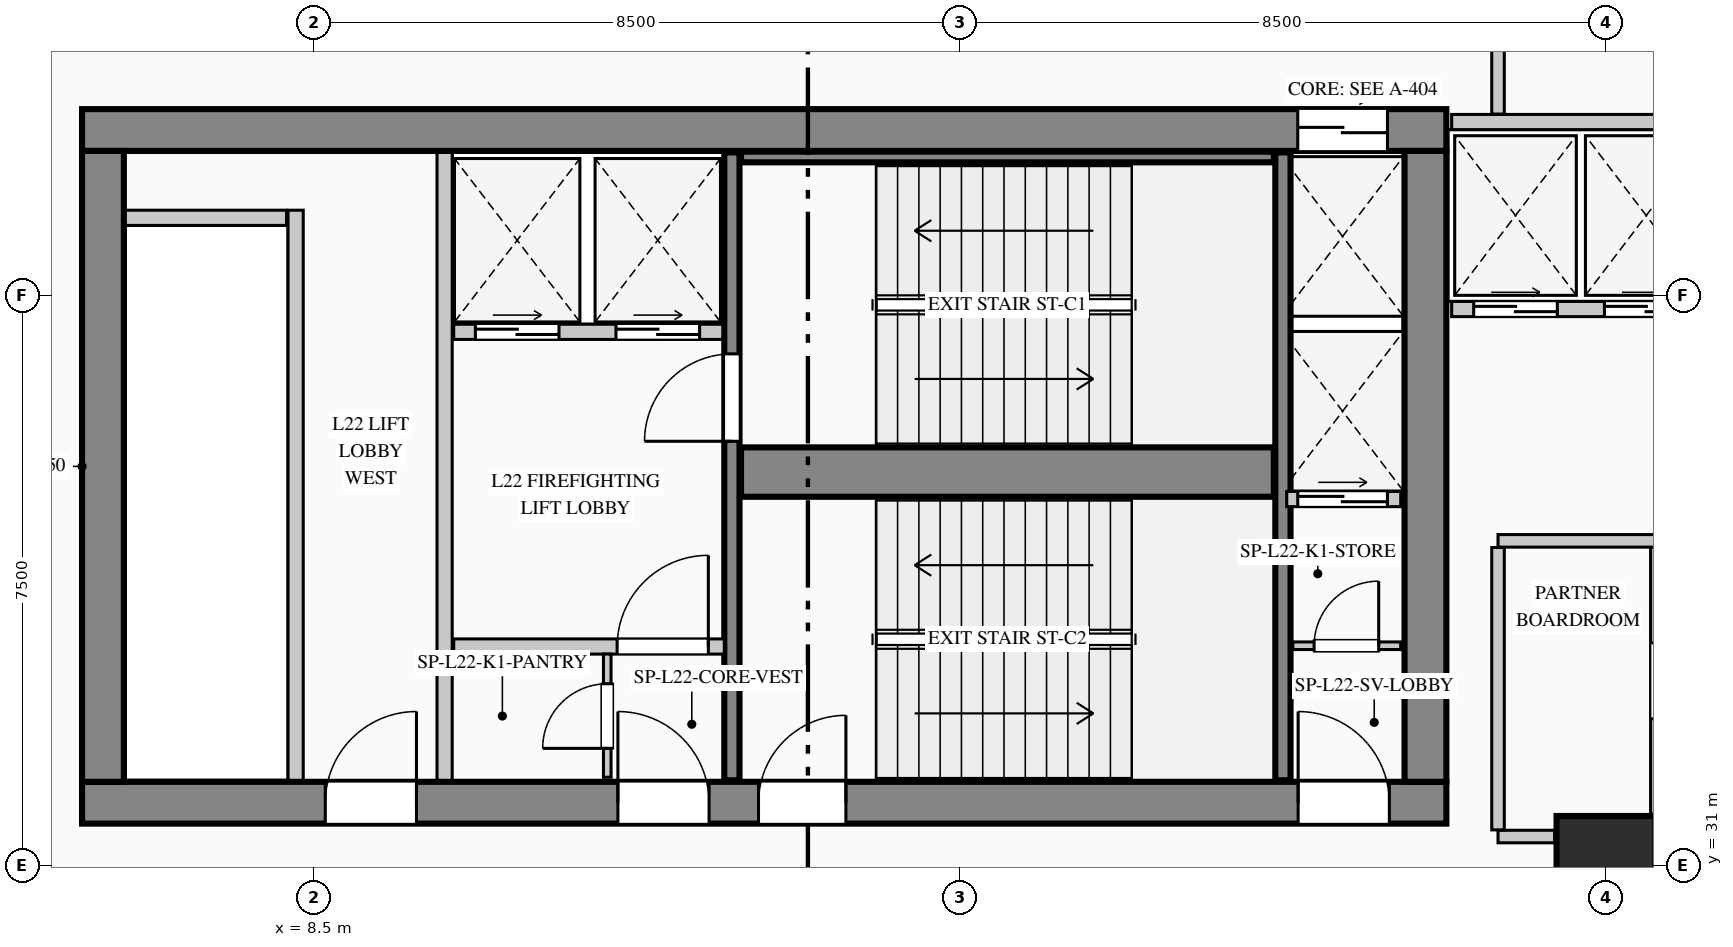
"""IFC4 building model, lengths in metres.
Left out: names, types, materials, properties, quantities, classifications, styles, units other than length and angle.
Written with IfcOpenShell. Run it as: python <this file> out.ifc"""

import sys

from ifc_helpers import new_model, si_unit, direction, frame, frame_2d, origin, origin_2d, place, context, subcontext, project, spatial, rectangle, extrude, element, fill, save


model = new_model("IFC4")
c1 = context("Model", 3, precision=1e-05, world=origin(), true_north=direction((0.0, 1.0)))
c2 = subcontext(c1, "Body", "Model", "MODEL_VIEW")
j1 = project(units=[si_unit("LENGTHUNIT", "METRE"), si_unit("PLANEANGLEUNIT", "RADIAN")], contexts=[c1])
p1 = place(None, origin())
s1 = spatial("IfcSite", under=j1, at=p1, CompositionType="ELEMENT")
p2 = place(p1, origin())
s2 = spatial("IfcBuilding", under=s1, at=p2, CompositionType="ELEMENT")
p3 = place(p2, frame((0.0, 0.0, 97.4)))
s3 = spatial("IfcBuildingStorey", under=s2, at=p3, CompositionType="ELEMENT", Elevation=97.4)
p4 = place(p3, frame((5.45, 40.675, 0.0), z_axis=(0.0, 0.0, 1.0), x_axis=(1.0, 0.0, 0.0)))
e1 = element("IfcWall", 1, at=p4, inside=s3, PredefinedType="SHEAR", context=c2, shape_type="SweptSolid", body=[
    extrude(rectangle(XDim=17.95, YDim=0.55, at=frame_2d((8.975, 0.0))), origin(), (0.0, 0.0, 1.0), 4.4),
])
p5 = place(p4, frame((15.995, 0.0, 0.0)))
e2 = element("IfcOpeningElement", 2, at=p5, cuts=e1, PredefinedType="OPENING", context=c2, shape_type="SweptSolid", body=[
    extrude(rectangle(XDim=1.18, YDim=2.25, at=frame_2d((0.59, 1.125))), frame((0.0, 0.285, 0.0), z_axis=(0.0, -1.0, 0.0), x_axis=(1.0, 0.0, 0.0)), (0.0, 0.0, 1.0), 0.57),
])
p6 = place(p3, frame((5.45, 31.825, 0.0), z_axis=(0.0, 0.0, 1.0), x_axis=(1.0, 0.0, 0.0)))
e3 = element("IfcWall", 3, at=p6, inside=s3, PredefinedType="SHEAR", context=c2, shape_type="SweptSolid", body=[
    extrude(rectangle(XDim=17.95, YDim=0.55, at=frame_2d((8.975, 0.0))), origin(), (0.0, 0.0, 1.0), 4.4),
])
p7 = place(p6, frame((3.2, 0.0, 0.0)))
e4 = element("IfcOpeningElement", 4, at=p7, cuts=e3, PredefinedType="OPENING", context=c2, shape_type="SweptSolid", body=[
    extrude(rectangle(XDim=1.2, YDim=2.2, at=frame_2d((0.6, 1.1))), frame((0.0, 0.285, 0.0), z_axis=(0.0, -1.0, 0.0), x_axis=(1.0, 0.0, 0.0)), (0.0, 0.0, 1.0), 0.57),
])
p8 = place(p6, frame((7.05, 0.0, 0.0)))
e5 = element("IfcOpeningElement", 5, at=p8, cuts=e3, PredefinedType="OPENING", context=c2, shape_type="SweptSolid", body=[
    extrude(rectangle(XDim=1.2, YDim=2.2, at=frame_2d((0.6, 1.1))), frame((0.0, 0.285, 0.0), z_axis=(0.0, -1.0, 0.0), x_axis=(1.0, 0.0, 0.0)), (0.0, 0.0, 1.0), 0.57),
])
p9 = place(p6, frame((8.9, 0.0, 0.0)))
e6 = element("IfcOpeningElement", 6, at=p9, cuts=e3, PredefinedType="OPENING", context=c2, shape_type="SweptSolid", body=[
    extrude(rectangle(XDim=1.15, YDim=2.2, at=frame_2d((0.575, 1.1))), frame((0.0, 0.285, 0.0), z_axis=(0.0, -1.0, 0.0), x_axis=(1.0, 0.0, 0.0)), (0.0, 0.0, 1.0), 0.57),
])
p10 = place(p6, frame((16.0, 0.0, 0.0)))
e7 = element("IfcOpeningElement", 7, at=p10, cuts=e3, PredefinedType="OPENING", context=c2, shape_type="SweptSolid", body=[
    extrude(rectangle(XDim=1.2, YDim=2.2, at=frame_2d((0.6, 1.1))), frame((0.0, 0.285, 0.0), z_axis=(0.0, -1.0, 0.0), x_axis=(1.0, 0.0, 0.0)), (0.0, 0.0, 1.0), 0.57),
])
for number, where, z_axis, x_axis in (
    (8, (5.725, 32.1, 0.0), (0.0, 0.0, 1.0), (0.0, 1.0, 0.0)),
    (9, (23.125, 32.1, 0.0), (0.0, 0.0, 1.0), (0.0, 1.0, 0.0)),
):
    element("IfcWall", number, at=place(p3, frame(where, z_axis=z_axis, x_axis=x_axis)), inside=s3, PredefinedType="SHEAR", context=c2, shape_type="SweptSolid", body=[
        extrude(rectangle(XDim=8.3, YDim=0.55, at=frame_2d((4.15, 0.0))), origin(), (0.0, 0.0, 1.0), 4.4),
    ])
p11 = place(p3, frame((14.0, 32.12, 0.0), z_axis=(0.0, 0.0, 1.0), x_axis=(0.0, 1.0, 0.0)))
e10 = element("IfcWall", 10, at=p11, inside=s3, PredefinedType="SHEAR", context=c2, shape_type="SweptSolid", body=[
    extrude(rectangle(XDim=8.26, YDim=0.2, at=frame_2d((4.13, 0.0))), origin(), (0.0, 0.0, 1.0), 4.4),
])
p12 = place(p11, frame((4.46, 0.0, 0.0)))
e11 = element("IfcOpeningElement", 11, at=p12, cuts=e10, PredefinedType="OPENING", context=c2, shape_type="SweptSolid", body=[
    extrude(rectangle(XDim=1.15, YDim=2.2, at=frame_2d((0.575, 1.1))), frame((0.0, 0.11, 0.0), z_axis=(0.0, -1.0, 0.0), x_axis=(1.0, 0.0, 0.0)), (0.0, 0.0, 1.0), 0.22),
])
p13 = place(p3, frame((14.12, 36.175, 0.0), z_axis=(0.0, 0.0, 1.0), x_axis=(1.0, 0.0, 0.0)))
e12 = element("IfcWall", 12, at=p13, inside=s3, PredefinedType="SHEAR", context=c2, shape_type="SweptSolid", body=[
    extrude(rectangle(XDim=7.01, YDim=0.65, at=frame_2d((3.505, 0.0))), origin(), (0.0, 0.0, 1.0), 4.4),
])
p14 = place(p3, frame((21.25, 32.12, 0.0), z_axis=(0.0, 0.0, 1.0), x_axis=(0.0, 1.0, 0.0)))
e13 = element("IfcWall", 13, at=p14, inside=s3, PredefinedType="SHEAR", context=c2, shape_type="SweptSolid", body=[
    extrude(rectangle(XDim=8.26, YDim=0.2, at=frame_2d((4.13, 0.0))), origin(), (0.0, 0.0, 1.0), 4.4),
])
p15 = place(p3, frame((14.12, 40.32, 0.0), z_axis=(0.0, 0.0, 1.0), x_axis=(1.0, 0.0, 0.0)))
e14 = element("IfcWall", 14, at=p15, inside=s3, PredefinedType="SHEAR", context=c2, shape_type="SweptSolid", body=[
    extrude(rectangle(XDim=7.01, YDim=0.14, at=frame_2d((3.505, 0.0))), origin(), (0.0, 0.0, 1.0), 4.4),
])
p16 = place(p3, frame((25.5, 31.0, 0.0), z_axis=(0.0, 0.0, 1.0), x_axis=(1.0, 0.0, 0.0)))
e15 = element("IfcColumn", 15, at=p16, inside=s3, PredefinedType="COLUMN", context=c2, shape_type="SweptSolid", body=[
    extrude(rectangle(XDim=1.3, YDim=1.3, at=origin_2d()), origin(), (0.0, 0.0, 1.0), 4.4),
])
p17 = place(p3, frame((8.523, 4.84, 0.0), z_axis=(0.0, 0.0, 1.0), x_axis=(-0.150394554312, 0.988626055712, 0.0)))
e16 = element("IfcWall", 16, at=p17, inside=s3, PredefinedType="STANDARD", context=c2, shape_type="SweptSolid", body=[
    extrude(rectangle(XDim=36.738, YDim=0.28, at=frame_2d((18.369, 0.0))), origin(), (0.0, 0.0, 1.0), 4.115),
])
p18 = place(p17, frame((22.612, 0.0, 0.9)))
e17 = element("IfcOpeningElement", 17, at=p18, cuts=e16, PredefinedType="OPENING", context=c2, shape_type="SweptSolid", body=[
    extrude(rectangle(XDim=1.8, YDim=2.1, at=frame_2d((0.9, 1.05))), frame((0.0, 0.15, 0.0), z_axis=(0.0, -1.0, 0.0), x_axis=(1.0, 0.0, 0.0)), (0.0, 0.0, 1.0), 0.3),
])
p19 = place(p3, frame((8.26, 32.12, 0.0), z_axis=(0.0, 0.0, 1.0), x_axis=(0.0, 1.0, 0.0)))
e18 = element("IfcWall", 18, at=p19, inside=s3, PredefinedType="PARTITIONING", context=c2, shape_type="SweptSolid", body=[
    extrude(rectangle(XDim=7.5, YDim=0.2, at=frame_2d((3.75, 0.0))), origin(), (0.0, 0.0, 1.0), 4.115),
])
p20 = place(p3, frame((6.02, 39.52, 0.0), z_axis=(0.0, 0.0, 1.0), x_axis=(1.0, 0.0, 0.0)))
e19 = element("IfcWall", 19, at=p20, inside=s3, PredefinedType="PARTITIONING", context=c2, shape_type="SweptSolid", body=[
    extrude(rectangle(XDim=2.12, YDim=0.2, at=frame_2d((1.06, 0.0))), origin(), (0.0, 0.0, 1.0), 4.115),
])
p21 = place(p3, frame((10.22, 32.12, 0.0), z_axis=(0.0, 0.0, 1.0), x_axis=(0.0, 1.0, 0.0)))
e20 = element("IfcWall", 20, at=p21, inside=s3, PredefinedType="PARTITIONING", context=c2, shape_type="SweptSolid", body=[
    extrude(rectangle(XDim=8.26, YDim=0.2, at=frame_2d((4.13, 0.0))), origin(), (0.0, 0.0, 1.0), 4.115),
])
p22 = place(p3, frame((10.34, 38.02, 0.0), z_axis=(0.0, 0.0, 1.0), x_axis=(1.0, 0.0, 0.0)))
e21 = element("IfcWall", 21, at=p22, inside=s3, PredefinedType="PARTITIONING", context=c2, shape_type="SweptSolid", body=[
    extrude(rectangle(XDim=3.54, YDim=0.2, at=frame_2d((1.77, 0.0))), origin(), (0.0, 0.0, 1.0), 4.115),
])
p23 = place(p22, frame((0.285, 0.0, 0.0)))
e22 = element("IfcOpeningElement", 22, at=p23, cuts=e21, PredefinedType="OPENING", context=c2, shape_type="SweptSolid", body=[
    extrude(rectangle(XDim=1.1, YDim=2.2, at=frame_2d((0.55, 1.1))), frame((0.0, 0.11, 0.0), z_axis=(0.0, -1.0, 0.0), x_axis=(1.0, 0.0, 0.0)), (0.0, 0.0, 1.0), 0.22),
])
p24 = place(p22, frame((2.135, 0.0, 0.0)))
e23 = element("IfcOpeningElement", 23, at=p24, cuts=e21, PredefinedType="OPENING", context=c2, shape_type="SweptSolid", body=[
    extrude(rectangle(XDim=1.1, YDim=2.2, at=frame_2d((0.55, 1.1))), frame((0.0, 0.11, 0.0), z_axis=(0.0, -1.0, 0.0), x_axis=(1.0, 0.0, 0.0)), (0.0, 0.0, 1.0), 0.22),
])
p25 = place(p3, frame((10.34, 33.88, 0.0), z_axis=(0.0, 0.0, 1.0), x_axis=(1.0, 0.0, 0.0)))
e24 = element("IfcWall", 24, at=p25, inside=s3, PredefinedType="PARTITIONING", context=c2, shape_type="SweptSolid", body=[
    extrude(rectangle(XDim=3.56, YDim=0.2, at=frame_2d((1.78, 0.0))), origin(), (0.0, 0.0, 1.0), 4.115),
])
p26 = place(p25, frame((2.15, 0.0, 0.0)))
e25 = element("IfcOpeningElement", 25, at=p26, cuts=e24, PredefinedType="OPENING", context=c2, shape_type="SweptSolid", body=[
    extrude(rectangle(XDim=1.2, YDim=2.2, at=frame_2d((0.6, 1.1))), frame((0.0, 0.11, 0.0), z_axis=(0.0, -1.0, 0.0), x_axis=(1.0, 0.0, 0.0)), (0.0, 0.0, 1.0), 0.22),
])
p27 = place(p3, frame((12.36, 32.16, 0.0), z_axis=(0.0, 0.0, 1.0), x_axis=(0.0, 1.0, 0.0)))
e26 = element("IfcWall", 26, at=p27, inside=s3, PredefinedType="PARTITIONING", context=c2, shape_type="SweptSolid", body=[
    extrude(rectangle(XDim=1.62, YDim=0.1, at=frame_2d((0.81, 0.0))), origin(), (0.0, 0.0, 1.0), 4.115),
])
p28 = place(p27, frame((0.38, 0.0, 0.0)))
e27 = element("IfcOpeningElement", 27, at=p28, cuts=e26, PredefinedType="OPENING", context=c2, shape_type="SweptSolid", body=[
    extrude(rectangle(XDim=0.85, YDim=2.1, at=frame_2d((0.425, 1.05))), frame((0.0, 0.06, 0.0), z_axis=(0.0, -1.0, 0.0), x_axis=(1.0, 0.0, 0.0)), (0.0, 0.0, 1.0), 0.12),
])
p29 = place(p3, frame((21.38, 33.89, 0.0), z_axis=(0.0, 0.0, 1.0), x_axis=(1.0, 0.0, 0.0)))
e28 = element("IfcWall", 28, at=p29, inside=s3, PredefinedType="PARTITIONING", context=c2, shape_type="SweptSolid", body=[
    extrude(rectangle(XDim=1.42, YDim=0.1, at=frame_2d((0.71, 0.0))), origin(), (0.0, 0.0, 1.0), 4.115),
])
p30 = place(p29, frame((0.28, 0.0, 0.0)))
e29 = element("IfcOpeningElement", 29, at=p30, cuts=e28, PredefinedType="OPENING", context=c2, shape_type="SweptSolid", body=[
    extrude(rectangle(XDim=0.85, YDim=2.1, at=frame_2d((0.425, 1.05))), frame((0.0, 0.06, 0.0), z_axis=(0.0, -1.0, 0.0), x_axis=(1.0, 0.0, 0.0)), (0.0, 0.0, 1.0), 0.12),
])
p31 = place(p3, frame((21.3, 35.82, 0.0), z_axis=(0.0, 0.0, 1.0), x_axis=(1.0, 0.0, 0.0)))
e30 = element("IfcWall", 30, at=p31, inside=s3, PredefinedType="PARTITIONING", context=c2, shape_type="SweptSolid", body=[
    extrude(rectangle(XDim=1.5, YDim=0.2, at=frame_2d((0.75, 0.0))), origin(), (0.0, 0.0, 1.0), 4.115),
])
p32 = place(p31, frame((0.145, 0.0, 0.0)))
e31 = element("IfcOpeningElement", 31, at=p32, cuts=e30, PredefinedType="OPENING", context=c2, shape_type="SweptSolid", body=[
    extrude(rectangle(XDim=1.18, YDim=2.25, at=frame_2d((0.59, 1.125))), frame((0.0, 0.11, 0.0), z_axis=(0.0, -1.0, 0.0), x_axis=(1.0, 0.0, 0.0)), (0.0, 0.0, 1.0), 0.22),
])
p33 = place(p3, frame((23.47, 40.78, 0.0), z_axis=(0.0, 0.0, 1.0), x_axis=(1.0, 0.0, 0.0)))
e32 = element("IfcWall", 32, at=p33, inside=s3, PredefinedType="PARTITIONING", context=c2, shape_type="SweptSolid", body=[
    extrude(rectangle(XDim=6.91, YDim=0.2, at=frame_2d((3.455, 0.0))), origin(), (0.0, 0.0, 1.0), 4.115),
])
p34 = place(p3, frame((23.47, 38.32, 0.0), z_axis=(0.0, 0.0, 1.0), x_axis=(1.0, 0.0, 0.0)))
e33 = element("IfcWall", 33, at=p34, inside=s3, PredefinedType="PARTITIONING", context=c2, shape_type="SweptSolid", body=[
    extrude(rectangle(XDim=6.79, YDim=0.2, at=frame_2d((3.395, 0.0))), origin(), (0.0, 0.0, 1.0), 4.115),
])
p35 = place(p34, frame((0.29, 0.0, 0.0)))
e34 = element("IfcOpeningElement", 34, at=p35, cuts=e33, PredefinedType="OPENING", context=c2, shape_type="SweptSolid", body=[
    extrude(rectangle(XDim=1.1, YDim=2.2, at=frame_2d((0.55, 1.1))), frame((0.0, 0.11, 0.0), z_axis=(0.0, -1.0, 0.0), x_axis=(1.0, 0.0, 0.0)), (0.0, 0.0, 1.0), 0.22),
])
p36 = place(p34, frame((2.01, 0.0, 0.0)))
e35 = element("IfcOpeningElement", 35, at=p36, cuts=e33, PredefinedType="OPENING", context=c2, shape_type="SweptSolid", body=[
    extrude(rectangle(XDim=1.1, YDim=2.2, at=frame_2d((0.55, 1.1))), frame((0.0, 0.11, 0.0), z_axis=(0.0, -1.0, 0.0), x_axis=(1.0, 0.0, 0.0)), (0.0, 0.0, 1.0), 0.22),
])
p37 = place(p34, frame((3.73, 0.0, 0.0)))
e36 = element("IfcOpeningElement", 36, at=p37, cuts=e33, PredefinedType="OPENING", context=c2, shape_type="SweptSolid", body=[
    extrude(rectangle(XDim=1.1, YDim=2.2, at=frame_2d((0.55, 1.1))), frame((0.0, 0.11, 0.0), z_axis=(0.0, -1.0, 0.0), x_axis=(1.0, 0.0, 0.0)), (0.0, 0.0, 1.0), 0.22),
])
p38 = place(p34, frame((5.45, 0.0, 0.0)))
e37 = element("IfcOpeningElement", 37, at=p38, cuts=e33, PredefinedType="OPENING", context=c2, shape_type="SweptSolid", body=[
    extrude(rectangle(XDim=1.1, YDim=2.2, at=frame_2d((0.55, 1.1))), frame((0.0, 0.11, 0.0), z_axis=(0.0, -1.0, 0.0), x_axis=(1.0, 0.0, 0.0)), (0.0, 0.0, 1.0), 0.22),
])
p39 = place(p3, frame((24.08, 35.27, 0.0), z_axis=(0.0, 0.0, 1.0), x_axis=(1.0, 0.0, 0.0)))
e38 = element("IfcWall", 38, at=p39, inside=s3, PredefinedType="PARTITIONING", context=c2, shape_type="SweptSolid", body=[
    extrude(rectangle(XDim=2.09, YDim=0.165, at=frame_2d((1.045, 0.0))), origin(), (0.0, 0.0, 1.0), 4.115),
])
p40 = place(p3, frame((26.17, 35.183, 0.0), z_axis=(0.0, 0.0, 1.0), x_axis=(0.0, -1.0, 0.0)))
e39 = element("IfcWall", 39, at=p40, inside=s3, PredefinedType="PARTITIONING", context=c2, shape_type="SweptSolid", body=[
    extrude(rectangle(XDim=3.508, YDim=0.165, at=frame_2d((1.754, 0.0))), origin(), (0.0, 0.0, 1.0), 4.115),
])
p41 = place(p40, frame((1.254, 0.0, 0.0)))
e40 = element("IfcOpeningElement", 40, at=p41, cuts=e39, PredefinedType="OPENING", context=c2, shape_type="SweptSolid", body=[
    extrude(rectangle(XDim=1.0, YDim=2.15, at=frame_2d((0.5, 1.075))), frame((0.0, 0.093, 0.0), z_axis=(0.0, -1.0, 0.0), x_axis=(1.0, 0.0, 0.0)), (0.0, 0.0, 1.0), 0.185),
])
p42 = place(p3, frame((24.825, 31.38, 0.0), z_axis=(0.0, 0.0, 1.0), x_axis=(-1.0, 0.0, 0.0)))
e41 = element("IfcWall", 41, at=p42, inside=s3, PredefinedType="PARTITIONING", context=c2, shape_type="SweptSolid", body=[
    extrude(rectangle(XDim=0.745, YDim=0.165, at=frame_2d((0.373, 0.0))), origin(), (0.0, 0.0, 1.0), 4.115),
])
p43 = place(p3, frame((24.08, 31.468, 0.0), z_axis=(0.0, 0.0, 1.0), x_axis=(0.0, 1.0, 0.0)))
e42 = element("IfcWall", 42, at=p43, inside=s3, PredefinedType="PARTITIONING", context=c2, shape_type="SweptSolid", body=[
    extrude(rectangle(XDim=3.715, YDim=0.165, at=frame_2d((1.857, 0.0))), origin(), (0.0, 0.0, 1.0), 4.115),
])
p44 = place(p3, frame((24.08, 40.885, 0.0), z_axis=(0.0, 0.0, 1.0), x_axis=(0.0, 1.0, 0.0)))
e43 = element("IfcWall", 43, at=p44, inside=s3, PredefinedType="PARTITIONING", context=c2, shape_type="SweptSolid", body=[
    extrude(rectangle(XDim=2.33, YDim=0.165, at=frame_2d((1.165, 0.0))), origin(), (0.0, 0.0, 1.0), 4.115),
])
p45 = place(p7, origin())
e44 = element("IfcDoor", 44, at=p45, inside=s3, OperationType="SINGLE_SWING_RIGHT", PredefinedType="DOOR", context=c2, shape_type="SweptSolid", body=[
    extrude(rectangle(XDim=1.2, YDim=2.2, at=frame_2d((0.6, 1.1))), frame((0.0, 0.025, 0.0), z_axis=(0.0, -1.0, 0.0), x_axis=(1.0, 0.0, 0.0)), (0.0, 0.0, 1.0), 0.05),
])
fill(e4, e44)
p46 = place(p8, origin())
e45 = element("IfcDoor", 45, at=p46, inside=s3, OperationType="SINGLE_SWING_LEFT", PredefinedType="DOOR", context=c2, shape_type="SweptSolid", body=[
    extrude(rectangle(XDim=1.2, YDim=2.2, at=frame_2d((0.6, 1.1))), frame((0.0, 0.025, 0.0), z_axis=(0.0, -1.0, 0.0), x_axis=(1.0, 0.0, 0.0)), (0.0, 0.0, 1.0), 0.05),
])
fill(e5, e45)
p47 = place(p9, origin())
e46 = element("IfcDoor", 46, at=p47, inside=s3, OperationType="SINGLE_SWING_RIGHT", PredefinedType="DOOR", context=c2, shape_type="SweptSolid", body=[
    extrude(rectangle(XDim=1.15, YDim=2.2, at=frame_2d((0.575, 1.1))), frame((0.0, 0.025, 0.0), z_axis=(0.0, -1.0, 0.0), x_axis=(1.0, 0.0, 0.0)), (0.0, 0.0, 1.0), 0.05),
])
fill(e6, e46)
p48 = place(p10, origin())
e47 = element("IfcDoor", 47, at=p48, inside=s3, OperationType="SINGLE_SWING_LEFT", PredefinedType="DOOR", context=c2, shape_type="SweptSolid", body=[
    extrude(rectangle(XDim=1.2, YDim=2.2, at=frame_2d((0.6, 1.1))), frame((0.0, 0.025, 0.0), z_axis=(0.0, -1.0, 0.0), x_axis=(1.0, 0.0, 0.0)), (0.0, 0.0, 1.0), 0.05),
])
fill(e7, e47)
p49 = place(p26, origin())
e48 = element("IfcDoor", 48, at=p49, inside=s3, OperationType="SINGLE_SWING_RIGHT", PredefinedType="DOOR", context=c2, shape_type="SweptSolid", body=[
    extrude(rectangle(XDim=1.2, YDim=2.2, at=frame_2d((0.6, 1.1))), frame((0.0, 0.025, 0.0), z_axis=(0.0, -1.0, 0.0), x_axis=(1.0, 0.0, 0.0)), (0.0, 0.0, 1.0), 0.05),
])
fill(e25, e48)
p50 = place(p28, origin())
e49 = element("IfcDoor", 49, at=p50, inside=s3, OperationType="SINGLE_SWING_LEFT", PredefinedType="DOOR", context=c2, shape_type="SweptSolid", body=[
    extrude(rectangle(XDim=0.85, YDim=2.1, at=frame_2d((0.425, 1.05))), frame((0.0, 0.025, 0.0), z_axis=(0.0, -1.0, 0.0), x_axis=(1.0, 0.0, 0.0)), (0.0, 0.0, 1.0), 0.05),
])
fill(e27, e49)
p51 = place(p30, origin())
e50 = element("IfcDoor", 50, at=p51, inside=s3, OperationType="SINGLE_SWING_RIGHT", PredefinedType="DOOR", context=c2, shape_type="SweptSolid", body=[
    extrude(rectangle(XDim=0.85, YDim=2.1, at=frame_2d((0.425, 1.05))), frame((0.0, 0.025, 0.0), z_axis=(0.0, -1.0, 0.0), x_axis=(1.0, 0.0, 0.0)), (0.0, 0.0, 1.0), 0.05),
])
fill(e29, e50)
p52 = place(p12, origin())
e51 = element("IfcDoor", 51, at=p52, inside=s3, OperationType="SINGLE_SWING_LEFT", PredefinedType="DOOR", context=c2, shape_type="SweptSolid", body=[
    extrude(rectangle(XDim=1.15, YDim=2.2, at=frame_2d((0.575, 1.1))), frame((0.0, 0.025, 0.0), z_axis=(0.0, -1.0, 0.0), x_axis=(1.0, 0.0, 0.0)), (0.0, 0.0, 1.0), 0.05),
])
fill(e11, e51)
p53 = place(p23, origin())
e52 = element("IfcDoor", 52, at=p53, inside=s3, OperationType="DOUBLE_DOOR_SLIDING", PredefinedType="DOOR", context=c2, shape_type="SweptSolid", body=[
    extrude(rectangle(XDim=1.1, YDim=2.2, at=frame_2d((0.55, 1.1))), frame((0.0, 0.025, 0.0), z_axis=(0.0, -1.0, 0.0), x_axis=(1.0, 0.0, 0.0)), (0.0, 0.0, 1.0), 0.05),
])
fill(e22, e52)
p54 = place(p24, origin())
e53 = element("IfcDoor", 53, at=p54, inside=s3, OperationType="DOUBLE_DOOR_SLIDING", PredefinedType="DOOR", context=c2, shape_type="SweptSolid", body=[
    extrude(rectangle(XDim=1.1, YDim=2.2, at=frame_2d((0.55, 1.1))), frame((0.0, 0.025, 0.0), z_axis=(0.0, -1.0, 0.0), x_axis=(1.0, 0.0, 0.0)), (0.0, 0.0, 1.0), 0.05),
])
fill(e23, e53)
p55 = place(p5, origin())
e54 = element("IfcDoor", 54, at=p55, inside=s3, OperationType="DOUBLE_DOOR_SLIDING", PredefinedType="DOOR", context=c2, shape_type="SweptSolid", body=[
    extrude(rectangle(XDim=1.18, YDim=2.25, at=frame_2d((0.59, 1.125))), frame((0.0, 0.025, 0.0), z_axis=(0.0, -1.0, 0.0), x_axis=(1.0, 0.0, 0.0)), (0.0, 0.0, 1.0), 0.05),
])
fill(e2, e54)
p56 = place(p32, origin())
e55 = element("IfcDoor", 55, at=p56, inside=s3, OperationType="DOUBLE_DOOR_SLIDING", PredefinedType="DOOR", context=c2, shape_type="SweptSolid", body=[
    extrude(rectangle(XDim=1.18, YDim=2.25, at=frame_2d((0.59, 1.125))), frame((0.0, 0.025, 0.0), z_axis=(0.0, -1.0, 0.0), x_axis=(1.0, 0.0, 0.0)), (0.0, 0.0, 1.0), 0.05),
])
fill(e31, e55)
p57 = place(p35, origin())
e56 = element("IfcDoor", 56, at=p57, inside=s3, OperationType="DOUBLE_DOOR_SLIDING", PredefinedType="DOOR", context=c2, shape_type="SweptSolid", body=[
    extrude(rectangle(XDim=1.1, YDim=2.2, at=frame_2d((0.55, 1.1))), frame((0.0, 0.025, 0.0), z_axis=(0.0, -1.0, 0.0), x_axis=(1.0, 0.0, 0.0)), (0.0, 0.0, 1.0), 0.05),
])
fill(e34, e56)
p58 = place(p36, origin())
e57 = element("IfcDoor", 57, at=p58, inside=s3, OperationType="DOUBLE_DOOR_SLIDING", PredefinedType="DOOR", context=c2, shape_type="SweptSolid", body=[
    extrude(rectangle(XDim=1.1, YDim=2.2, at=frame_2d((0.55, 1.1))), frame((0.0, 0.025, 0.0), z_axis=(0.0, -1.0, 0.0), x_axis=(1.0, 0.0, 0.0)), (0.0, 0.0, 1.0), 0.05),
])
fill(e35, e57)
save(model, sys.argv[1])
